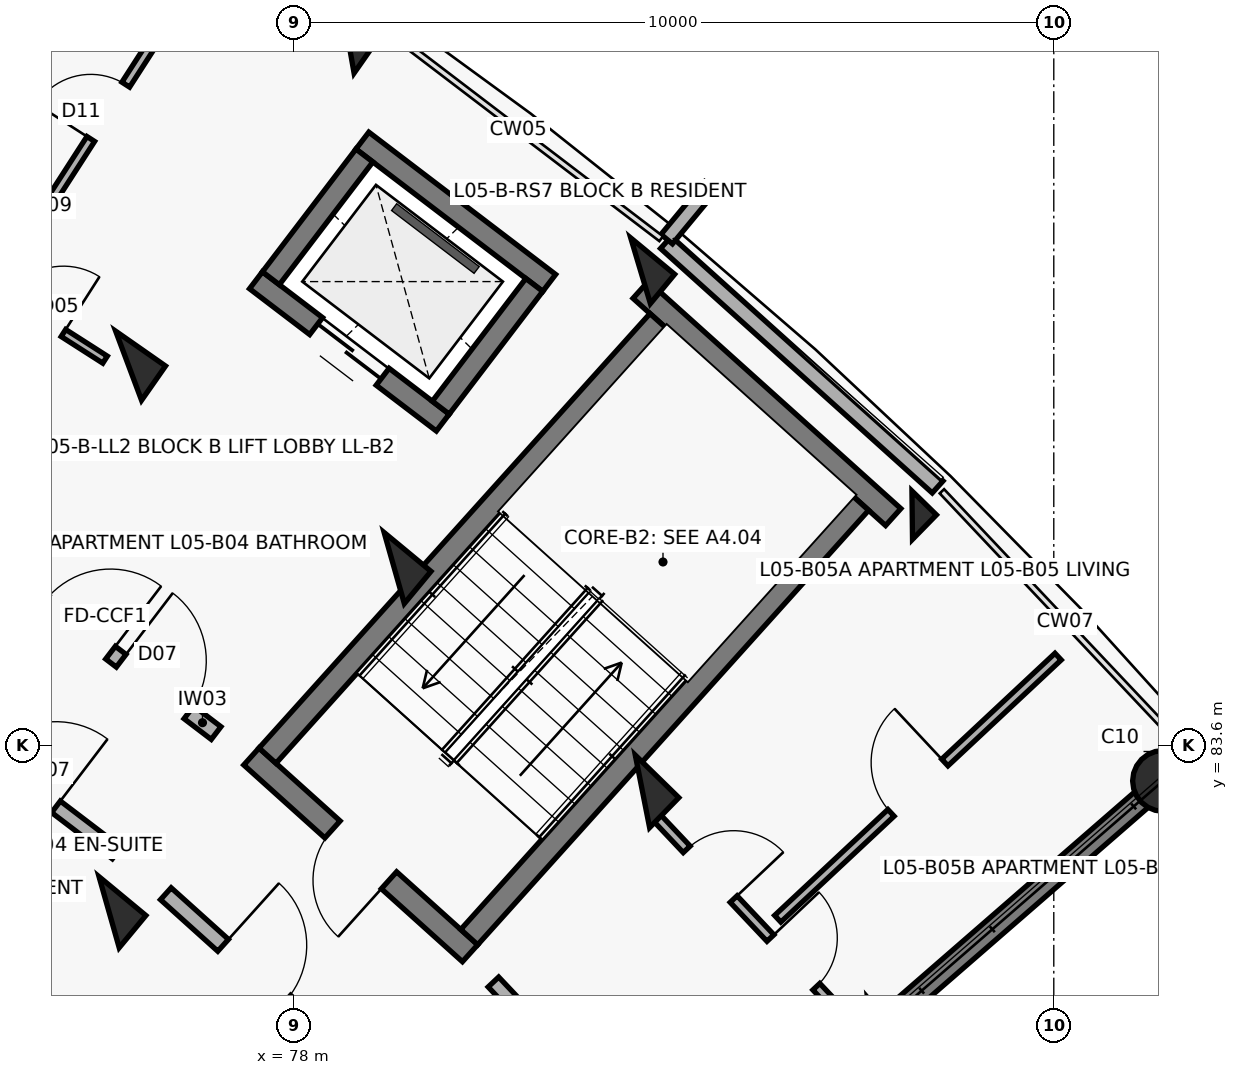
"""IFC4 building model, lengths in metres.
Left out: names, types, materials, properties, quantities, classifications, styles, units other than length and angle.
Written with IfcOpenShell. Run it as: python <this file> out.ifc"""

import sys

from ifc_helpers import new_model, si_unit, direction, frame, frame_2d, origin, origin_2d, place, context, subcontext, project, spatial, rectangle, circle, extrude, element, fill, save


model = new_model("IFC4")
c1 = context("Model", 3, precision=1e-05, world=origin(), true_north=direction((0.0, 1.0)))
c2 = subcontext(c1, "Body", "Model", "MODEL_VIEW")
j1 = project(units=[si_unit("LENGTHUNIT", "METRE"), si_unit("PLANEANGLEUNIT", "RADIAN")], contexts=[c1])
p1 = place(None, origin())
s1 = spatial("IfcSite", under=j1, at=p1, CompositionType="ELEMENT")
p2 = place(p1, origin())
s2 = spatial("IfcBuilding", under=s1, at=p2, CompositionType="ELEMENT")
p3 = place(p2, frame((0.0, 0.0, 17.4)))
s3 = spatial("IfcBuildingStorey", under=s2, at=p3, CompositionType="ELEMENT", Elevation=17.4)
p4 = place(p3, frame((75.828, 88.592, 0.0), z_axis=(0.0, 0.0, 1.0), x_axis=(0.573004420611, 0.819552276527, 0.0)))
e1 = element("IfcColumn", 1, at=p4, inside=s3, PredefinedType="COLUMN", context=c2, shape_type="SweptSolid", body=[
    extrude(rectangle(XDim=0.55, YDim=0.8, at=origin_2d()), origin(), (0.0, 0.0, 1.0), 3.1),
])
p5 = place(p3, frame((78.739, 92.755, 0.0), z_axis=(0.0, 0.0, 1.0), x_axis=(0.573004420611, 0.819552276527, 0.0)))
e2 = element("IfcColumn", 2, at=p5, inside=s3, PredefinedType="COLUMN", context=c2, shape_type="SweptSolid", body=[
    extrude(rectangle(XDim=0.45, YDim=0.45, at=origin_2d()), origin(), (0.0, 0.0, 1.0), 3.1),
])
for number, where, z_axis, x_axis in (
    (3, (75.571, 81.402, 0.0), (0.0, 0.0, 1.0), (0.638, 0.77, 0.0)),
    (4, (79.322, 85.93, 0.0), (0.0, 0.0, 1.0), (0.638, 0.77, 0.0)),
):
    element("IfcColumn", number, at=place(p3, frame(where, z_axis=z_axis, x_axis=x_axis)), inside=s3, PredefinedType="COLUMN", context=c2, shape_type="SweptSolid", body=[
        extrude(rectangle(XDim=0.55, YDim=0.8, at=origin_2d()), origin(), (0.0, 0.0, 1.0), 3.1),
    ])
p6 = place(p3, frame((82.563, 89.842, 0.0), z_axis=(0.0, 0.0, 1.0), x_axis=(0.637961754089, 0.770068049148, 0.0)))
e5 = element("IfcColumn", 5, at=p6, inside=s3, PredefinedType="COLUMN", context=c2, shape_type="SweptSolid", body=[
    extrude(rectangle(XDim=0.5, YDim=0.75, at=origin_2d()), origin(), (0.0, 0.0, 1.0), 3.1),
])
p7 = place(p3, frame((82.588, 82.991, 0.0), z_axis=(0.0, 0.0, 1.0), x_axis=(0.698665066769, 0.715448897181, 0.0)))
e6 = element("IfcColumn", 6, at=p7, inside=s3, PredefinedType="COLUMN", context=c2, shape_type="SweptSolid", body=[
    extrude(rectangle(XDim=0.55, YDim=0.8, at=origin_2d()), origin(), (0.0, 0.0, 1.0), 3.1),
])
p8 = place(p3, frame((86.137, 86.626, 0.0), z_axis=(0.0, 0.0, 1.0), x_axis=(0.698665066769, 0.715448897181, 0.0)))
e7 = element("IfcColumn", 7, at=p8, inside=s3, PredefinedType="COLUMN", context=c2, shape_type="SweptSolid", body=[
    extrude(rectangle(XDim=0.45, YDim=0.45, at=origin_2d()), origin(), (0.0, 0.0, 1.0), 3.1),
])
p9 = place(p3, frame((89.437, 83.129, 0.0), z_axis=(0.0, 0.0, 1.0), x_axis=(0.754709580223, 0.656059028991, 0.0)))
e8 = element("IfcColumn", 8, at=p9, inside=s3, PredefinedType="COLUMN", context=c2, shape_type="SweptSolid", body=[
    extrude(circle(Radius=0.4, at=origin_2d()), origin(), (0.0, 0.0, 1.0), 3.1),
])
p10 = place(p3, frame((85.739, 79.914, 0.0), z_axis=(0.0, 0.0, 1.0), x_axis=(0.754703505217, 0.65606601742, 0.0)))
e9 = element("IfcWall", 9, at=p10, inside=s3, PredefinedType="SHEAR", context=c2, shape_type="SweptSolid", body=[
    extrude(rectangle(XDim=4.72, YDim=0.27, at=frame_2d((2.36, 0.0))), origin(), (0.0, 0.0, 1.0), 2.86),
])
p11 = place(p3, frame((82.897, 90.213, 0.0), z_axis=(0.0, 0.0, 1.0), x_axis=(0.743387539862, -0.668860946369, 0.0)))
e10 = element("IfcWall", 10, at=p11, inside=s3, PredefinedType="SOLIDWALL", context=c2, shape_type="SweptSolid", body=[
    extrude(rectangle(XDim=4.809, YDim=0.212, at=frame_2d((2.405, 0.0))), origin(), (0.0, 0.0, 1.0), 2.25),
])
p12 = place(p3, frame((82.908, 90.257, 0.0), z_axis=(0.0, 0.0, 1.0), x_axis=(0.637967316825, 0.770063440674, 0.0)))
e11 = element("IfcWall", 11, at=p12, inside=s3, PredefinedType="PARAPET", context=c2, shape_type="SweptSolid", body=[
    extrude(rectangle(XDim=0.9, YDim=0.195, at=frame_2d((0.45, 0.0))), origin(), (0.0, 0.0, 1.0), 2.25),
])
p13 = place(p3, frame((80.32, 80.862, 0.0), z_axis=(0.0, 0.0, 1.0), x_axis=(-0.743375696158, 0.668874109501, 0.0)))
e12 = element("IfcWall", 12, at=p13, inside=s3, PredefinedType="SHEAR", context=c2, shape_type="SweptSolid", body=[
    extrude(rectangle(XDim=3.87, YDim=0.3, at=frame_2d((1.935, 0.0))), origin(), (0.0, 0.0, 1.0), 3.1),
])
p14 = place(p13, frame((1.435, 0.0, 0.0)))
e13 = element("IfcOpeningElement", 13, at=p14, cuts=e12, PredefinedType="OPENING", context=c2, shape_type="SweptSolid", body=[
    extrude(rectangle(XDim=1.0, YDim=2.15, at=frame_2d((0.5, 1.075))), frame((0.0, 0.16, 0.0), z_axis=(0.0, -1.0, 0.0), x_axis=(1.0, 0.0, 0.0)), (0.0, 0.0, 1.0), 0.32),
])
p15 = place(p3, frame((85.887, 86.601, 0.0), z_axis=(0.0, 0.0, 1.0), x_axis=(-0.743400052815, 0.668847038922, 0.0)))
e14 = element("IfcWall", 14, at=p15, inside=s3, PredefinedType="SHEAR", context=c2, shape_type="SweptSolid", body=[
    extrude(rectangle(XDim=4.47, YDim=0.3, at=frame_2d((2.235, 0.0))), origin(), (0.0, 0.0, 1.0), 3.1),
])
p16 = place(p3, frame((80.309, 81.073, 0.0), z_axis=(0.0, 0.0, 1.0), x_axis=(0.668885797871, 0.743365179038, 0.0)))
e15 = element("IfcWall", 15, at=p16, inside=s3, PredefinedType="SHEAR", context=c2, shape_type="SweptSolid", body=[
    extrude(rectangle(XDim=7.69, YDim=0.3, at=frame_2d((3.845, 0.0))), origin(), (0.0, 0.0, 1.0), 3.1),
])
p17 = place(p3, frame((77.655, 83.461, 0.0), z_axis=(0.0, 0.0, 1.0), x_axis=(0.668868253964, 0.743380964808, 0.0)))
e16 = element("IfcWall", 16, at=p17, inside=s3, PredefinedType="SHEAR", context=c2, shape_type="SweptSolid", body=[
    extrude(rectangle(XDim=7.69, YDim=0.3, at=frame_2d((3.845, 0.0))), origin(), (0.0, 0.0, 1.0), 3.1),
])
p18 = place(p3, frame((79.961, 87.844, 0.0), z_axis=(0.0, 0.0, 1.0), x_axis=(-0.795464365424, 0.606000365793, 0.0)))
e17 = element("IfcWall", 17, at=p18, inside=s3, PredefinedType="SHEAR", context=c2, shape_type="SweptSolid", body=[
    extrude(rectangle(XDim=3.09, YDim=0.28, at=frame_2d((1.545, 0.0))), origin(), (0.0, 0.0, 1.0), 3.1),
])
p19 = place(p18, frame((0.995, 0.0, 0.0)))
e18 = element("IfcOpeningElement", 18, at=p19, cuts=e17, PredefinedType="OPENING", context=c2, shape_type="SweptSolid", body=[
    extrude(rectangle(XDim=1.1, YDim=2.15, at=frame_2d((0.55, 1.075))), frame((0.0, 0.15, 0.0), z_axis=(0.0, -1.0, 0.0), x_axis=(1.0, 0.0, 0.0)), (0.0, 0.0, 1.0), 0.3),
])
p20 = place(p3, frame((81.361, 89.681, 0.0), z_axis=(0.0, 0.0, 1.0), x_axis=(-0.795502452183, 0.605950368076, 0.0)))
e19 = element("IfcWall", 19, at=p20, inside=s3, PredefinedType="SHEAR", context=c2, shape_type="SweptSolid", body=[
    extrude(rectangle(XDim=3.09, YDim=0.28, at=frame_2d((1.545, 0.0))), origin(), (0.0, 0.0, 1.0), 3.1),
])
for number, where, z_axis, x_axis in (
    (20, (79.935, 88.04, 0.0), (0.0, 0.0, 1.0), (0.606, 0.795, 0.0)),
    (21, (77.699, 89.743, 0.0), (0.0, 0.0, 1.0), (0.606, 0.795, 0.0)),
):
    element("IfcWall", number, at=place(p3, frame(where, z_axis=z_axis, x_axis=x_axis)), inside=s3, PredefinedType="SHEAR", context=c2, shape_type="SweptSolid", body=[
        extrude(rectangle(XDim=2.03, YDim=0.28, at=frame_2d((1.015, 0.0))), origin(), (0.0, 0.0, 1.0), 3.1),
    ])
p21 = place(p3, frame((72.33, 90.712, 0.0), z_axis=(0.0, 0.0, 1.0), x_axis=(0.842245628842, -0.539093962771, 0.0)))
e22 = element("IfcWall", 22, at=p21, inside=s3, PredefinedType="PARTITIONING", context=c2, shape_type="SweptSolid", body=[
    extrude(rectangle(XDim=3.785, YDim=0.11, at=frame_2d((1.893, 0.0))), origin(), (0.0, 0.0, 1.0), 2.08),
])
p22 = place(p21, frame((0.65, 0.0, 0.0)))
e23 = element("IfcOpeningElement", 23, at=p22, cuts=e22, PredefinedType="OPENING", context=c2, shape_type="SweptSolid", body=[
    extrude(rectangle(XDim=0.9, YDim=2.1, at=frame_2d((0.45, 1.05))), frame((0.0, 0.065, 0.0), z_axis=(0.0, -1.0, 0.0), x_axis=(1.0, 0.0, 0.0)), (0.0, 0.0, 1.0), 0.13),
])
p23 = place(p21, frame((2.255, 0.0, 0.0)))
e24 = element("IfcOpeningElement", 24, at=p23, cuts=e22, PredefinedType="OPENING", context=c2, shape_type="SweptSolid", body=[
    extrude(rectangle(XDim=0.88, YDim=2.1, at=frame_2d((0.44, 1.05))), frame((0.0, 0.065, 0.0), z_axis=(0.0, -1.0, 0.0), x_axis=(1.0, 0.0, 0.0)), (0.0, 0.0, 1.0), 0.13),
])
p24 = place(p3, frame((74.192, 89.81, 0.0), z_axis=(0.0, 0.0, 1.0), x_axis=(0.541612517702, 0.840628265447, 0.0)))
e25 = element("IfcWall", 25, at=p24, inside=s3, PredefinedType="PARTITIONING", context=c2, shape_type="SweptSolid", body=[
    extrude(rectangle(XDim=5.05, YDim=0.12, at=frame_2d((2.525, 0.0))), origin(), (0.0, 0.0, 1.0), 2.08),
])
p25 = place(p24, frame((2.1, 0.0, 0.0)))
e26 = element("IfcOpeningElement", 26, at=p25, cuts=e25, PredefinedType="OPENING", context=c2, shape_type="SweptSolid", body=[
    extrude(rectangle(XDim=0.85, YDim=2.1, at=frame_2d((0.425, 1.05))), frame((0.0, 0.07, 0.0), z_axis=(0.0, -1.0, 0.0), x_axis=(1.0, 0.0, 0.0)), (0.0, 0.0, 1.0), 0.14),
])
p26 = place(p3, frame((74.357, 85.756, 0.0), z_axis=(0.0, 0.0, 1.0), x_axis=(0.795498026433, -0.605956178235, 0.0)))
e27 = element("IfcWall", 27, at=p26, inside=s3, PredefinedType="SOLIDWALL", context=c2, shape_type="SweptSolid", body=[
    extrude(rectangle(XDim=3.296, YDim=0.21, at=frame_2d((1.648, 0.0))), origin(), (0.0, 0.0, 1.0), 2.08),
])
p27 = place(p26, frame((0.45, 0.0, 0.0)))
e28 = element("IfcOpeningElement", 28, at=p27, cuts=e27, PredefinedType="OPENING", context=c2, shape_type="SweptSolid", body=[
    extrude(rectangle(XDim=1.1, YDim=2.15, at=frame_2d((0.55, 1.075))), frame((0.0, 0.115, 0.0), z_axis=(0.0, -1.0, 0.0), x_axis=(1.0, 0.0, 0.0)), (0.0, 0.0, 1.0), 0.23),
])
p28 = place(p26, frame((1.726, 0.0, 0.0)))
e29 = element("IfcOpeningElement", 29, at=p28, cuts=e27, PredefinedType="OPENING", context=c2, shape_type="SweptSolid", body=[
    extrude(rectangle(XDim=1.12, YDim=2.15, at=frame_2d((0.56, 1.075))), frame((0.0, 0.115, 0.0), z_axis=(0.0, -1.0, 0.0), x_axis=(1.0, 0.0, 0.0)), (0.0, 0.0, 1.0), 0.23),
])
p29 = place(p3, frame((73.182, 84.076, 0.0), z_axis=(0.0, 0.0, 1.0), x_axis=(0.795501577908, -0.605951515838, 0.0)))
e30 = element("IfcWall", 30, at=p29, inside=s3, PredefinedType="SOLIDWALL", context=c2, shape_type="SweptSolid", body=[
    extrude(rectangle(XDim=3.129, YDim=0.19, at=frame_2d((1.564, 0.0))), origin(), (0.0, 0.0, 1.0), 2.08),
])
p30 = place(p29, frame((1.004, 0.0, 0.0)))
e31 = element("IfcOpeningElement", 31, at=p30, cuts=e30, PredefinedType="OPENING", context=c2, shape_type="SweptSolid", body=[
    extrude(rectangle(XDim=1.12, YDim=2.15, at=frame_2d((0.56, 1.075))), frame((0.0, 0.105, 0.0), z_axis=(0.0, -1.0, 0.0), x_axis=(1.0, 0.0, 0.0)), (0.0, 0.0, 1.0), 0.21),
])
p31 = place(p3, frame((76.317, 81.644, 0.0), z_axis=(0.0, 0.0, 1.0), x_axis=(0.743387266925, -0.668861249718, 0.0)))
e32 = element("IfcWall", 32, at=p31, inside=s3, PredefinedType="SOLIDWALL", context=c2, shape_type="SweptSolid", body=[
    extrude(rectangle(XDim=3.128, YDim=0.21, at=frame_2d((1.564, 0.0))), origin(), (0.0, 0.0, 1.0), 2.08),
])
p32 = place(p31, frame((1.014, 0.0, 0.0)))
e33 = element("IfcOpeningElement", 33, at=p32, cuts=e32, PredefinedType="OPENING", context=c2, shape_type="SweptSolid", body=[
    extrude(rectangle(XDim=1.1, YDim=2.15, at=frame_2d((0.55, 1.075))), frame((0.0, 0.115, 0.0), z_axis=(0.0, -1.0, 0.0), x_axis=(1.0, 0.0, 0.0)), (0.0, 0.0, 1.0), 0.23),
])
p33 = place(p3, frame((80.628, 80.483, 0.0), z_axis=(0.0, 0.0, 1.0), x_axis=(0.686310507227, -0.727308660522, 0.0)))
e34 = element("IfcWall", 34, at=p33, inside=s3, PredefinedType="SOLIDWALL", context=c2, shape_type="SweptSolid", body=[
    extrude(rectangle(XDim=3.436, YDim=0.19, at=frame_2d((1.718, 0.0))), origin(), (0.0, 0.0, 1.0), 2.08),
])
p34 = place(p33, frame((1.228, 0.0, 0.0)))
e35 = element("IfcOpeningElement", 35, at=p34, cuts=e34, PredefinedType="OPENING", context=c2, shape_type="SweptSolid", body=[
    extrude(rectangle(XDim=0.98, YDim=2.15, at=frame_2d((0.49, 1.075))), frame((0.0, 0.105, 0.0), z_axis=(0.0, -1.0, 0.0), x_axis=(1.0, 0.0, 0.0)), (0.0, 0.0, 1.0), 0.21),
])
p35 = place(p3, frame((82.724, 82.701, 0.0), z_axis=(0.0, 0.0, 1.0), x_axis=(0.686331812627, -0.72728855551, 0.0)))
e36 = element("IfcWall", 36, at=p35, inside=s3, PredefinedType="PARTITIONING", context=c2, shape_type="SweptSolid", body=[
    extrude(rectangle(XDim=3.785, YDim=0.125, at=frame_2d((1.893, 0.0))), origin(), (0.0, 0.0, 1.0), 2.08),
])
p36 = place(p35, frame((0.65, 0.0, 0.0)))
e37 = element("IfcOpeningElement", 37, at=p36, cuts=e36, PredefinedType="OPENING", context=c2, shape_type="SweptSolid", body=[
    extrude(rectangle(XDim=0.9, YDim=2.1, at=frame_2d((0.45, 1.05))), frame((0.0, 0.073, 0.0), z_axis=(0.0, -1.0, 0.0), x_axis=(1.0, 0.0, 0.0)), (0.0, 0.0, 1.0), 0.145),
])
p37 = place(p35, frame((2.255, 0.0, 0.0)))
e38 = element("IfcOpeningElement", 38, at=p37, cuts=e36, PredefinedType="OPENING", context=c2, shape_type="SweptSolid", body=[
    extrude(rectangle(XDim=0.88, YDim=2.1, at=frame_2d((0.44, 1.05))), frame((0.0, 0.073, 0.0), z_axis=(0.0, -1.0, 0.0), x_axis=(1.0, 0.0, 0.0)), (0.0, 0.0, 1.0), 0.145),
])
p38 = place(p3, frame((84.368, 81.315, 0.0), z_axis=(0.0, 0.0, 1.0), x_axis=(0.73037487973, 0.683046510173, 0.0)))
e39 = element("IfcWall", 39, at=p38, inside=s3, PredefinedType="PARTITIONING", context=c2, shape_type="SweptSolid", body=[
    extrude(rectangle(XDim=5.05, YDim=0.12, at=frame_2d((2.525, 0.0))), origin(), (0.0, 0.0, 1.0), 2.08),
])
p39 = place(p38, frame((2.04, 0.0, 0.0)))
e40 = element("IfcOpeningElement", 40, at=p39, cuts=e39, PredefinedType="OPENING", context=c2, shape_type="SweptSolid", body=[
    extrude(rectangle(XDim=0.97, YDim=2.1, at=frame_2d((0.485, 1.05))), frame((0.0, 0.07, 0.0), z_axis=(0.0, -1.0, 0.0), x_axis=(1.0, 0.0, 0.0)), (0.0, 0.0, 1.0), 0.14),
])
p40 = place(p14, origin())
e41 = element("IfcDoor", 41, at=p40, inside=s3, OperationType="SINGLE_SWING_LEFT", PredefinedType="DOOR", context=c2, shape_type="SweptSolid", body=[
    extrude(rectangle(XDim=1.0, YDim=2.15, at=frame_2d((0.5, 1.075))), frame((0.0, 0.025, 0.0), z_axis=(0.0, -1.0, 0.0), x_axis=(1.0, 0.0, 0.0)), (0.0, 0.0, 1.0), 0.05),
])
fill(e13, e41)
p41 = place(p19, origin())
e42 = element("IfcDoor", 42, at=p41, inside=s3, OperationType="DOUBLE_DOOR_SLIDING", PredefinedType="DOOR", context=c2, shape_type="SweptSolid", body=[
    extrude(rectangle(XDim=1.1, YDim=2.15, at=frame_2d((0.55, 1.075))), frame((0.0, 0.025, 0.0), z_axis=(0.0, -1.0, 0.0), x_axis=(1.0, 0.0, 0.0)), (0.0, 0.0, 1.0), 0.05),
])
fill(e18, e42)
p42 = place(p23, origin())
e43 = element("IfcDoor", 43, at=p42, inside=s3, OperationType="SINGLE_SWING_RIGHT", PredefinedType="DOOR", context=c2, shape_type="SweptSolid", body=[
    extrude(rectangle(XDim=0.88, YDim=2.1, at=frame_2d((0.44, 1.05))), frame((0.0, 0.025, 0.0), z_axis=(0.0, -1.0, 0.0), x_axis=(1.0, 0.0, 0.0)), (0.0, 0.0, 1.0), 0.05),
])
fill(e24, e43)
p43 = place(p25, origin())
e44 = element("IfcDoor", 44, at=p43, inside=s3, OperationType="SINGLE_SWING_LEFT", PredefinedType="DOOR", context=c2, shape_type="SweptSolid", body=[
    extrude(rectangle(XDim=0.85, YDim=2.1, at=frame_2d((0.425, 1.05))), frame((0.0, 0.025, 0.0), z_axis=(0.0, -1.0, 0.0), x_axis=(1.0, 0.0, 0.0)), (0.0, 0.0, 1.0), 0.05),
])
fill(e26, e44)
p44 = place(p27, origin())
e45 = element("IfcDoor", 45, at=p44, inside=s3, OperationType="SINGLE_SWING_RIGHT", PredefinedType="DOOR", context=c2, shape_type="SweptSolid", body=[
    extrude(rectangle(XDim=1.1, YDim=2.15, at=frame_2d((0.55, 1.075))), frame((0.0, 0.025, 0.0), z_axis=(0.0, -1.0, 0.0), x_axis=(1.0, 0.0, 0.0)), (0.0, 0.0, 1.0), 0.05),
])
fill(e28, e45)
p45 = place(p28, origin())
e46 = element("IfcDoor", 46, at=p45, inside=s3, OperationType="SINGLE_SWING_LEFT", PredefinedType="DOOR", context=c2, shape_type="SweptSolid", body=[
    extrude(rectangle(XDim=1.12, YDim=2.15, at=frame_2d((0.56, 1.075))), frame((0.0, 0.025, 0.0), z_axis=(0.0, -1.0, 0.0), x_axis=(1.0, 0.0, 0.0)), (0.0, 0.0, 1.0), 0.05),
])
fill(e29, e46)
p46 = place(p30, origin())
e47 = element("IfcDoor", 47, at=p46, inside=s3, OperationType="SINGLE_SWING_RIGHT", PredefinedType="DOOR", context=c2, shape_type="SweptSolid", body=[
    extrude(rectangle(XDim=1.12, YDim=2.15, at=frame_2d((0.56, 1.075))), frame((0.0, 0.025, 0.0), z_axis=(0.0, -1.0, 0.0), x_axis=(1.0, 0.0, 0.0)), (0.0, 0.0, 1.0), 0.05),
])
fill(e31, e47)
p47 = place(p32, origin())
e48 = element("IfcDoor", 48, at=p47, inside=s3, OperationType="SINGLE_SWING_LEFT", PredefinedType="DOOR", context=c2, shape_type="SweptSolid", body=[
    extrude(rectangle(XDim=1.1, YDim=2.15, at=frame_2d((0.55, 1.075))), frame((0.0, 0.025, 0.0), z_axis=(0.0, -1.0, 0.0), x_axis=(1.0, 0.0, 0.0)), (0.0, 0.0, 1.0), 0.05),
])
fill(e33, e48)
p48 = place(p36, origin())
e49 = element("IfcDoor", 49, at=p48, inside=s3, OperationType="SINGLE_SWING_RIGHT", PredefinedType="DOOR", context=c2, shape_type="SweptSolid", body=[
    extrude(rectangle(XDim=0.9, YDim=2.1, at=frame_2d((0.45, 1.05))), frame((0.0, 0.025, 0.0), z_axis=(0.0, -1.0, 0.0), x_axis=(1.0, 0.0, 0.0)), (0.0, 0.0, 1.0), 0.05),
])
fill(e37, e49)
p49 = place(p37, origin())
e50 = element("IfcDoor", 50, at=p49, inside=s3, OperationType="SINGLE_SWING_LEFT", PredefinedType="DOOR", context=c2, shape_type="SweptSolid", body=[
    extrude(rectangle(XDim=0.88, YDim=2.1, at=frame_2d((0.44, 1.05))), frame((0.0, 0.025, 0.0), z_axis=(0.0, -1.0, 0.0), x_axis=(1.0, 0.0, 0.0)), (0.0, 0.0, 1.0), 0.05),
])
fill(e38, e50)
p50 = place(p39, origin())
e51 = element("IfcDoor", 51, at=p50, inside=s3, OperationType="SINGLE_SWING_RIGHT", PredefinedType="DOOR", context=c2, shape_type="SweptSolid", body=[
    extrude(rectangle(XDim=0.97, YDim=2.1, at=frame_2d((0.485, 1.05))), frame((0.0, 0.025, 0.0), z_axis=(0.0, -1.0, 0.0), x_axis=(1.0, 0.0, 0.0)), (0.0, 0.0, 1.0), 0.05),
])
fill(e40, e51)
save(model, sys.argv[1])
